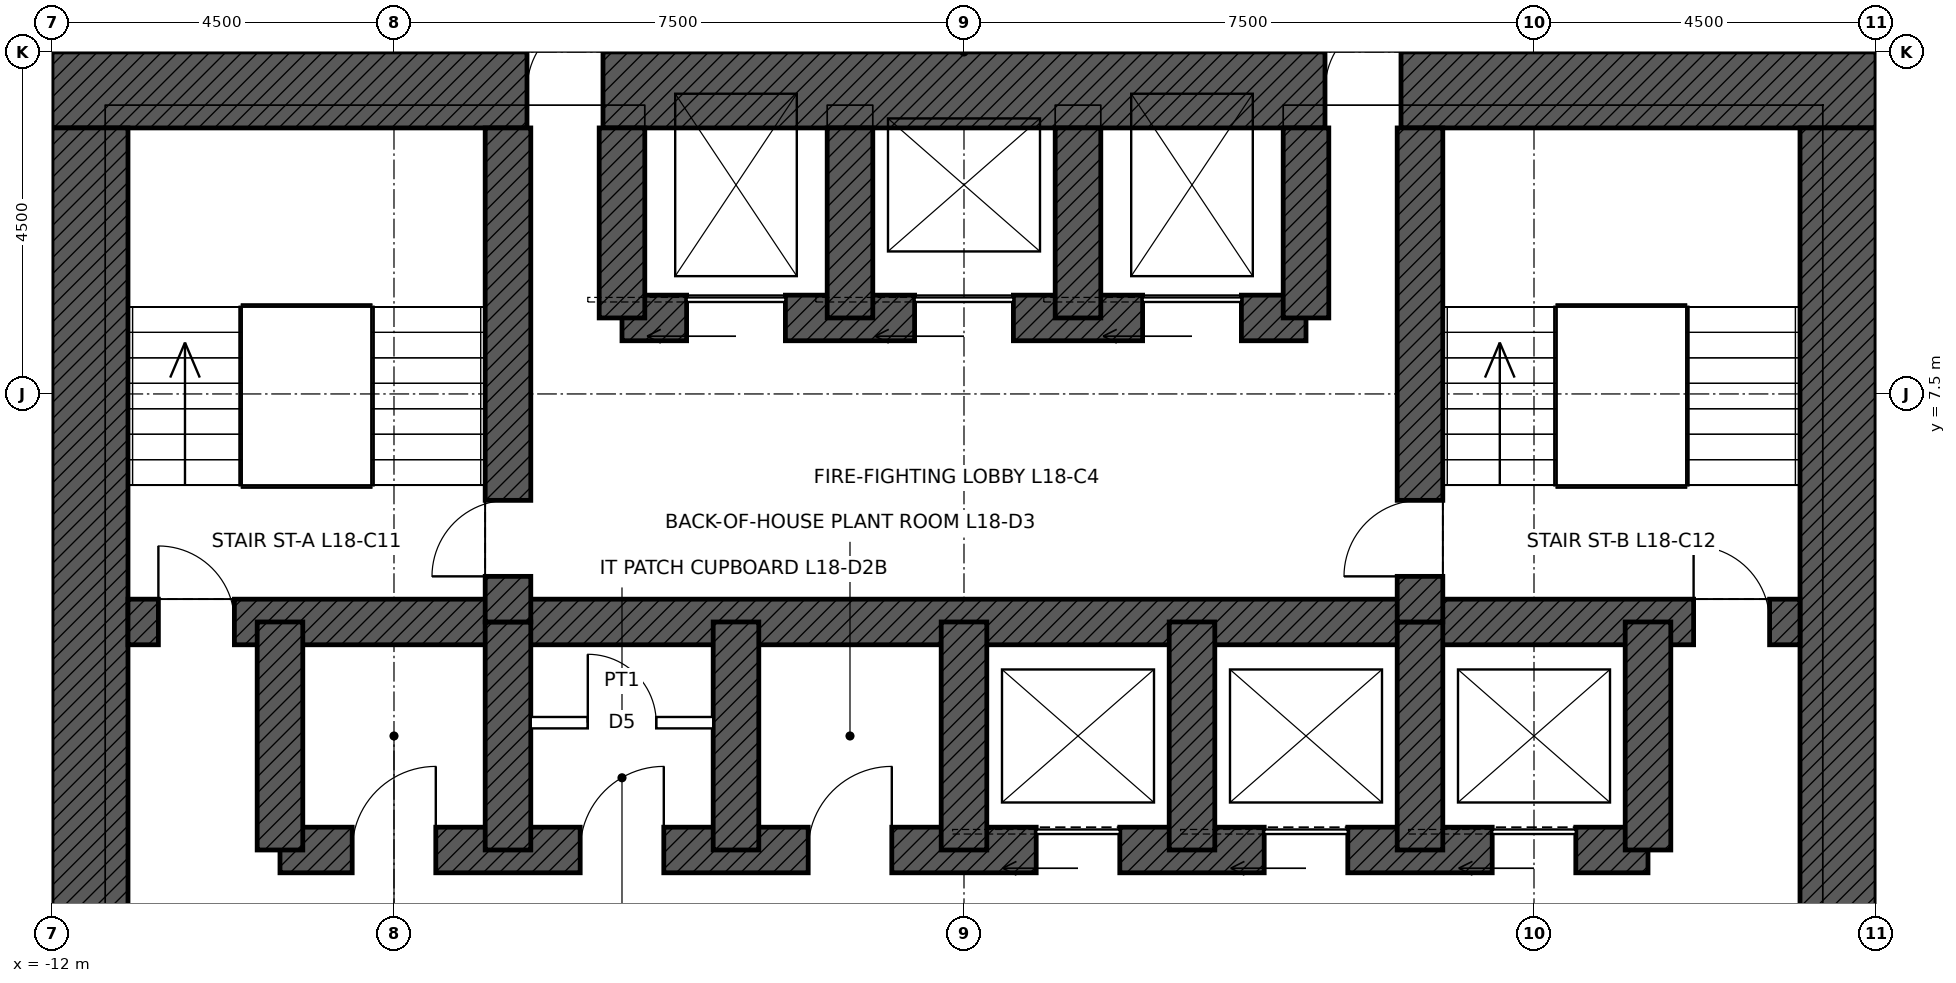
"""IFC4 building model, lengths in metres.
Left out: names, types, materials, properties, quantities, classifications, styles, units other than length and angle.
Written with IfcOpenShell. Run it as: python <this file> out.ifc"""

import sys

from ifc_helpers import new_model, si_unit, direction, frame, frame_2d, origin, place, context, subcontext, project, spatial, rectangle, extrude, element, fill, save


model = new_model("IFC4")
c1 = context("Model", 3, precision=1e-05, world=origin(), true_north=direction((0.0, 1.0)))
c2 = subcontext(c1, "Body", "Model", "MODEL_VIEW")
j1 = project(units=[si_unit("LENGTHUNIT", "METRE"), si_unit("PLANEANGLEUNIT", "RADIAN")], contexts=[c1])
p1 = place(None, origin())
s1 = spatial("IfcSite", under=j1, at=p1, CompositionType="ELEMENT")
p2 = place(p1, origin())
s2 = spatial("IfcBuilding", under=s1, at=p2, CompositionType="ELEMENT")
p3 = place(p2, frame((0.0, 0.0, 93.4)))
s3 = spatial("IfcBuildingStorey", under=s2, at=p3, CompositionType="ELEMENT", Elevation=93.4)
p4 = place(p3, frame((-12.0, 11.5, 0.0), z_axis=(0.0, 0.0, 1.0), x_axis=(1.0, 0.0, 0.0)))
e1 = element("IfcWall", 1, at=p4, inside=s3, PredefinedType="SHEAR", context=c2, shape_type="SweptSolid", body=[
    extrude(rectangle(XDim=24.0, YDim=1.0, at=frame_2d((12.0, 0.0))), origin(), (0.0, 0.0, 1.0), 5.0),
])
p5 = place(p4, frame((6.25, 0.0, 0.0)))
e2 = element("IfcOpeningElement", 2, at=p5, cuts=e1, PredefinedType="OPENING", context=c2, shape_type="SweptSolid", body=[
    extrude(rectangle(XDim=1.0, YDim=2.4, at=frame_2d((0.5, 1.2))), frame((0.0, 0.51, 0.0), z_axis=(0.0, -1.0, 0.0), x_axis=(1.0, 0.0, 0.0)), (0.0, 0.0, 1.0), 1.02),
])
p6 = place(p4, frame((16.75, 0.0, 0.0)))
e3 = element("IfcOpeningElement", 3, at=p6, cuts=e1, PredefinedType="OPENING", context=c2, shape_type="SweptSolid", body=[
    extrude(rectangle(XDim=1.0, YDim=2.4, at=frame_2d((0.5, 1.2))), frame((0.0, 0.51, 0.0), z_axis=(0.0, -1.0, 0.0), x_axis=(1.0, 0.0, 0.0)), (0.0, 0.0, 1.0), 1.02),
])
p7 = place(p3, frame((11.5, 11.0, 0.0), z_axis=(0.0, 0.0, 1.0), x_axis=(0.0, -1.0, 0.0)))
e4 = element("IfcWall", 4, at=p7, inside=s3, PredefinedType="SHEAR", context=c2, shape_type="SweptSolid", body=[
    extrude(rectangle(XDim=22.0, YDim=1.0, at=frame_2d((11.0, 0.0))), origin(), (0.0, 0.0, 1.0), 5.0),
])
p8 = place(p7, frame((10.5, 0.0, 0.0)))
e5 = element("IfcOpeningElement", 5, at=p8, cuts=e4, PredefinedType="OPENING", context=c2, shape_type="SweptSolid", body=[
    extrude(rectangle(XDim=1.0, YDim=2.4, at=frame_2d((0.5, 1.2))), frame((0.0, 0.51, 0.0), z_axis=(0.0, -1.0, 0.0), x_axis=(1.0, 0.0, 0.0)), (0.0, 0.0, 1.0), 1.02),
])
p9 = place(p3, frame((-11.5, -11.0, 0.0), z_axis=(0.0, 0.0, 1.0), x_axis=(0.0, 1.0, 0.0)))
e6 = element("IfcWall", 6, at=p9, inside=s3, PredefinedType="SHEAR", context=c2, shape_type="SweptSolid", body=[
    extrude(rectangle(XDim=22.0, YDim=1.0, at=frame_2d((11.0, 0.0))), origin(), (0.0, 0.0, 1.0), 5.0),
])
p10 = place(p9, frame((10.5, 0.0, 0.0)))
e7 = element("IfcOpeningElement", 7, at=p10, cuts=e6, PredefinedType="OPENING", context=c2, shape_type="SweptSolid", body=[
    extrude(rectangle(XDim=1.0, YDim=2.4, at=frame_2d((0.5, 1.2))), frame((0.0, 0.51, 0.0), z_axis=(0.0, -1.0, 0.0), x_axis=(1.0, 0.0, 0.0)), (0.0, 0.0, 1.0), 1.02),
])
p11 = place(p3, frame((-11.0, 4.5, 0.0), z_axis=(0.0, 0.0, 1.0), x_axis=(1.0, 0.0, 0.0)))
e8 = element("IfcWall", 8, at=p11, inside=s3, PredefinedType="SHEAR", context=c2, shape_type="SweptSolid", body=[
    extrude(rectangle(XDim=22.0, YDim=0.6, at=frame_2d((11.0, 0.0))), origin(), (0.0, 0.0, 1.0), 5.0),
])
p12 = place(p11, frame((0.4, 0.0, 0.0)))
e9 = element("IfcOpeningElement", 9, at=p12, cuts=e8, PredefinedType="OPENING", context=c2, shape_type="SweptSolid", body=[
    extrude(rectangle(XDim=1.0, YDim=2.1, at=frame_2d((0.5, 1.05))), frame((0.0, 0.31, 0.0), z_axis=(0.0, -1.0, 0.0), x_axis=(1.0, 0.0, 0.0)), (0.0, 0.0, 1.0), 0.62),
])
p13 = place(p11, frame((20.6, 0.0, 0.0)))
e10 = element("IfcOpeningElement", 10, at=p13, cuts=e8, PredefinedType="OPENING", context=c2, shape_type="SweptSolid", body=[
    extrude(rectangle(XDim=1.0, YDim=2.1, at=frame_2d((0.5, 1.05))), frame((0.0, 0.31, 0.0), z_axis=(0.0, -1.0, 0.0), x_axis=(1.0, 0.0, 0.0)), (0.0, 0.0, 1.0), 0.62),
])
p14 = place(p3, frame((-9.0, 1.5, 0.0), z_axis=(0.0, 0.0, 1.0), x_axis=(1.0, 0.0, 0.0)))
e11 = element("IfcWall", 11, at=p14, inside=s3, PredefinedType="SHEAR", context=c2, shape_type="SweptSolid", body=[
    extrude(rectangle(XDim=18.0, YDim=0.6, at=frame_2d((9.0, 0.0))), origin(), (0.0, 0.0, 1.0), 5.0),
])
p15 = place(p14, frame((9.95, 0.0, 0.0)))
e12 = element("IfcOpeningElement", 12, at=p15, cuts=e11, PredefinedType="OPENING", context=c2, shape_type="SweptSolid", body=[
    extrude(rectangle(XDim=1.1, YDim=2.1, at=frame_2d((0.55, 1.05))), frame((0.0, 0.31, 0.0), z_axis=(0.0, -1.0, 0.0), x_axis=(1.0, 0.0, 0.0)), (0.0, 0.0, 1.0), 0.62),
])
p16 = place(p14, frame((12.95, 0.0, 0.0)))
e13 = element("IfcOpeningElement", 13, at=p16, cuts=e11, PredefinedType="OPENING", context=c2, shape_type="SweptSolid", body=[
    extrude(rectangle(XDim=1.1, YDim=2.1, at=frame_2d((0.55, 1.05))), frame((0.0, 0.31, 0.0), z_axis=(0.0, -1.0, 0.0), x_axis=(1.0, 0.0, 0.0)), (0.0, 0.0, 1.0), 0.62),
])
p17 = place(p14, frame((15.95, 0.0, 0.0)))
e14 = element("IfcOpeningElement", 14, at=p17, cuts=e11, PredefinedType="OPENING", context=c2, shape_type="SweptSolid", body=[
    extrude(rectangle(XDim=1.1, YDim=2.1, at=frame_2d((0.55, 1.05))), frame((0.0, 0.31, 0.0), z_axis=(0.0, -1.0, 0.0), x_axis=(1.0, 0.0, 0.0)), (0.0, 0.0, 1.0), 0.62),
])
p18 = place(p14, frame((0.95, 0.0, 0.0)))
e15 = element("IfcOpeningElement", 15, at=p18, cuts=e11, PredefinedType="OPENING", context=c2, shape_type="SweptSolid", body=[
    extrude(rectangle(XDim=1.1, YDim=2.1, at=frame_2d((0.55, 1.05))), frame((0.0, 0.31, 0.0), z_axis=(0.0, -1.0, 0.0), x_axis=(1.0, 0.0, 0.0)), (0.0, 0.0, 1.0), 0.62),
])
p19 = place(p14, frame((3.95, 0.0, 0.0)))
e16 = element("IfcOpeningElement", 16, at=p19, cuts=e11, PredefinedType="OPENING", context=c2, shape_type="SweptSolid", body=[
    extrude(rectangle(XDim=1.1, YDim=2.1, at=frame_2d((0.55, 1.05))), frame((0.0, 0.31, 0.0), z_axis=(0.0, -1.0, 0.0), x_axis=(1.0, 0.0, 0.0)), (0.0, 0.0, 1.0), 0.62),
])
p20 = place(p14, frame((6.95, 0.0, 0.0)))
e17 = element("IfcOpeningElement", 17, at=p20, cuts=e11, PredefinedType="OPENING", context=c2, shape_type="SweptSolid", body=[
    extrude(rectangle(XDim=1.1, YDim=2.1, at=frame_2d((0.55, 1.05))), frame((0.0, 0.31, 0.0), z_axis=(0.0, -1.0, 0.0), x_axis=(1.0, 0.0, 0.0)), (0.0, 0.0, 1.0), 0.62),
])
p21 = place(p3, frame((-4.5, 8.5, 0.0), z_axis=(0.0, 0.0, 1.0), x_axis=(1.0, 0.0, 0.0)))
e18 = element("IfcWall", 18, at=p21, inside=s3, PredefinedType="SHEAR", context=c2, shape_type="SweptSolid", body=[
    extrude(rectangle(XDim=9.0, YDim=0.6, at=frame_2d((4.5, 0.0))), origin(), (0.0, 0.0, 1.0), 5.0),
])
p22 = place(p21, frame((0.85, 0.0, 0.0)))
e19 = element("IfcOpeningElement", 19, at=p22, cuts=e18, PredefinedType="OPENING", context=c2, shape_type="SweptSolid", body=[
    extrude(rectangle(XDim=1.3, YDim=2.4, at=frame_2d((0.65, 1.2))), frame((0.0, 0.31, 0.0), z_axis=(0.0, -1.0, 0.0), x_axis=(1.0, 0.0, 0.0)), (0.0, 0.0, 1.0), 0.62),
])
p23 = place(p21, frame((6.85, 0.0, 0.0)))
e20 = element("IfcOpeningElement", 20, at=p23, cuts=e18, PredefinedType="OPENING", context=c2, shape_type="SweptSolid", body=[
    extrude(rectangle(XDim=1.3, YDim=2.4, at=frame_2d((0.65, 1.2))), frame((0.0, 0.31, 0.0), z_axis=(0.0, -1.0, 0.0), x_axis=(1.0, 0.0, 0.0)), (0.0, 0.0, 1.0), 0.62),
])
p24 = place(p21, frame((3.85, 0.0, 0.0)))
e21 = element("IfcOpeningElement", 21, at=p24, cuts=e18, PredefinedType="OPENING", context=c2, shape_type="SweptSolid", body=[
    extrude(rectangle(XDim=1.3, YDim=2.4, at=frame_2d((0.65, 1.2))), frame((0.0, 0.31, 0.0), z_axis=(0.0, -1.0, 0.0), x_axis=(1.0, 0.0, 0.0)), (0.0, 0.0, 1.0), 0.62),
])
for number, where, z_axis, x_axis in (
    (22, (-9.0, 1.5, 0.0), (0.0, 0.0, 1.0), (0.0, 1.0, 0.0)),
    (23, (9.0, 1.5, 0.0), (0.0, 0.0, 1.0), (0.0, 1.0, 0.0)),
    (24, (-6.0, 1.5, 0.0), (0.0, 0.0, 1.0), (0.0, 1.0, 0.0)),
    (25, (-3.0, 1.5, 0.0), (0.0, 0.0, 1.0), (0.0, 1.0, 0.0)),
    (26, (0.0, 1.5, 0.0), (0.0, 0.0, 1.0), (0.0, 1.0, 0.0)),
    (27, (3.0, 1.5, 0.0), (0.0, 0.0, 1.0), (0.0, 1.0, 0.0)),
    (28, (6.0, 1.5, 0.0), (0.0, 0.0, 1.0), (0.0, 1.0, 0.0)),
):
    element("IfcWall", number, at=place(p3, frame(where, z_axis=z_axis, x_axis=x_axis)), inside=s3, PredefinedType="SHEAR", context=c2, shape_type="SweptSolid", body=[
        extrude(rectangle(XDim=3.0, YDim=0.6, at=frame_2d((1.5, 0.0))), origin(), (0.0, 0.0, 1.0), 5.0),
    ])
p25 = place(p3, frame((-6.0, 4.5, 0.0), z_axis=(0.0, 0.0, 1.0), x_axis=(0.0, 1.0, 0.0)))
e29 = element("IfcWall", 29, at=p25, inside=s3, PredefinedType="SHEAR", context=c2, shape_type="SweptSolid", body=[
    extrude(rectangle(XDim=6.5, YDim=0.6, at=frame_2d((3.25, 0.0))), origin(), (0.0, 0.0, 1.0), 5.0),
])
p26 = place(p25, frame((0.6, 0.0, 0.0)))
e30 = element("IfcOpeningElement", 30, at=p26, cuts=e29, PredefinedType="OPENING", context=c2, shape_type="SweptSolid", body=[
    extrude(rectangle(XDim=1.0, YDim=2.1, at=frame_2d((0.5, 1.05))), frame((0.0, 0.31, 0.0), z_axis=(0.0, -1.0, 0.0), x_axis=(1.0, 0.0, 0.0)), (0.0, 0.0, 1.0), 0.62),
])
p27 = place(p3, frame((6.0, 4.5, 0.0), z_axis=(0.0, 0.0, 1.0), x_axis=(0.0, 1.0, 0.0)))
e31 = element("IfcWall", 31, at=p27, inside=s3, PredefinedType="SHEAR", context=c2, shape_type="SweptSolid", body=[
    extrude(rectangle(XDim=6.5, YDim=0.6, at=frame_2d((3.25, 0.0))), origin(), (0.0, 0.0, 1.0), 5.0),
])
p28 = place(p27, frame((0.6, 0.0, 0.0)))
e32 = element("IfcOpeningElement", 32, at=p28, cuts=e31, PredefinedType="OPENING", context=c2, shape_type="SweptSolid", body=[
    extrude(rectangle(XDim=1.0, YDim=2.1, at=frame_2d((0.5, 1.05))), frame((0.0, 0.31, 0.0), z_axis=(0.0, -1.0, 0.0), x_axis=(1.0, 0.0, 0.0)), (0.0, 0.0, 1.0), 0.62),
])
for number, where, z_axis, x_axis in (
    (33, (-4.5, 8.5, 0.0), (0.0, 0.0, 1.0), (0.0, 1.0, 0.0)),
    (34, (4.5, 8.5, 0.0), (0.0, 0.0, 1.0), (0.0, 1.0, 0.0)),
    (35, (-1.5, 8.5, 0.0), (0.0, 0.0, 1.0), (0.0, 1.0, 0.0)),
    (36, (1.5, 8.5, 0.0), (0.0, 0.0, 1.0), (0.0, 1.0, 0.0)),
):
    element("IfcWall", number, at=place(p3, frame(where, z_axis=z_axis, x_axis=x_axis)), inside=s3, PredefinedType="SHEAR", context=c2, shape_type="SweptSolid", body=[
        extrude(rectangle(XDim=2.5, YDim=0.6, at=frame_2d((1.25, 0.0))), origin(), (0.0, 0.0, 1.0), 5.0),
    ])
p29 = place(p3, frame((-5.7, 3.175, 0.0), z_axis=(0.0, 0.0, 1.0), x_axis=(1.0, 0.0, 0.0)))
e37 = element("IfcWall", 37, at=p29, inside=s3, PredefinedType="PARTITIONING", context=c2, shape_type="SweptSolid", body=[
    extrude(rectangle(XDim=2.4, YDim=0.15, at=frame_2d((1.2, 0.0))), origin(), (0.0, 0.0, 1.0), 4.75),
])
p30 = place(p29, frame((0.75, 0.0, 0.0)))
e38 = element("IfcOpeningElement", 38, at=p30, cuts=e37, PredefinedType="OPENING", context=c2, shape_type="SweptSolid", body=[
    extrude(rectangle(XDim=0.9, YDim=2.1, at=frame_2d((0.45, 1.05))), frame((0.0, 0.085, 0.0), z_axis=(0.0, -1.0, 0.0), x_axis=(1.0, 0.0, 0.0)), (0.0, 0.0, 1.0), 0.17),
])
p31 = place(p12, origin())
e39 = element("IfcDoor", 39, at=p31, inside=s3, OperationType="SINGLE_SWING_LEFT", PredefinedType="DOOR", context=c2, shape_type="SweptSolid", body=[
    extrude(rectangle(XDim=1.0, YDim=2.1, at=frame_2d((0.5, 1.05))), frame((0.0, 0.025, 0.0), z_axis=(0.0, -1.0, 0.0), x_axis=(1.0, 0.0, 0.0)), (0.0, 0.0, 1.0), 0.05),
])
fill(e9, e39)
p32 = place(p13, origin())
e40 = element("IfcDoor", 40, at=p32, inside=s3, OperationType="SINGLE_SWING_LEFT", PredefinedType="DOOR", context=c2, shape_type="SweptSolid", body=[
    extrude(rectangle(XDim=1.0, YDim=2.1, at=frame_2d((0.5, 1.05))), frame((0.0, 0.025, 0.0), z_axis=(0.0, -1.0, 0.0), x_axis=(1.0, 0.0, 0.0)), (0.0, 0.0, 1.0), 0.05),
])
fill(e10, e40)
p33 = place(p26, origin())
e41 = element("IfcDoor", 41, at=p33, inside=s3, OperationType="SINGLE_SWING_LEFT", PredefinedType="DOOR", context=c2, shape_type="SweptSolid", body=[
    extrude(rectangle(XDim=1.0, YDim=2.1, at=frame_2d((0.5, 1.05))), frame((0.0, 0.025, 0.0), z_axis=(0.0, -1.0, 0.0), x_axis=(1.0, 0.0, 0.0)), (0.0, 0.0, 1.0), 0.05),
])
fill(e30, e41)
p34 = place(p28, origin())
e42 = element("IfcDoor", 42, at=p34, inside=s3, OperationType="SINGLE_SWING_LEFT", PredefinedType="DOOR", context=c2, shape_type="SweptSolid", body=[
    extrude(rectangle(XDim=1.0, YDim=2.1, at=frame_2d((0.5, 1.05))), frame((0.0, 0.025, 0.0), z_axis=(0.0, -1.0, 0.0), x_axis=(1.0, 0.0, 0.0)), (0.0, 0.0, 1.0), 0.05),
])
fill(e32, e42)
p35 = place(p5, origin())
e43 = element("IfcDoor", 43, at=p35, inside=s3, OperationType="SINGLE_SWING_RIGHT", PredefinedType="DOOR", context=c2, shape_type="SweptSolid", body=[
    extrude(rectangle(XDim=1.0, YDim=2.4, at=frame_2d((0.5, 1.2))), frame((0.0, 0.485, 0.0), z_axis=(0.0, -1.0, 0.0), x_axis=(1.0, 0.0, 0.0)), (0.0, 0.0, 1.0), 0.05),
])
fill(e2, e43)
p36 = place(p6, origin())
e44 = element("IfcDoor", 44, at=p36, inside=s3, OperationType="SINGLE_SWING_RIGHT", PredefinedType="DOOR", context=c2, shape_type="SweptSolid", body=[
    extrude(rectangle(XDim=1.0, YDim=2.4, at=frame_2d((0.5, 1.2))), frame((0.0, 0.485, 0.0), z_axis=(0.0, -1.0, 0.0), x_axis=(1.0, 0.0, 0.0)), (0.0, 0.0, 1.0), 0.05),
])
fill(e3, e44)
p37 = place(p22, origin())
e45 = element("IfcDoor", 45, at=p37, inside=s3, OperationType="SLIDING_TO_LEFT", PredefinedType="DOOR", context=c2, shape_type="SweptSolid", body=[
    extrude(rectangle(XDim=1.3, YDim=2.4, at=frame_2d((0.65, 1.2))), frame((0.0, 0.025, 0.0), z_axis=(0.0, -1.0, 0.0), x_axis=(1.0, 0.0, 0.0)), (0.0, 0.0, 1.0), 0.05),
])
fill(e19, e45)
p38 = place(p23, origin())
e46 = element("IfcDoor", 46, at=p38, inside=s3, OperationType="SLIDING_TO_LEFT", PredefinedType="DOOR", context=c2, shape_type="SweptSolid", body=[
    extrude(rectangle(XDim=1.3, YDim=2.4, at=frame_2d((0.65, 1.2))), frame((0.0, 0.025, 0.0), z_axis=(0.0, -1.0, 0.0), x_axis=(1.0, 0.0, 0.0)), (0.0, 0.0, 1.0), 0.05),
])
fill(e20, e46)
p39 = place(p24, origin())
e47 = element("IfcDoor", 47, at=p39, inside=s3, OperationType="SLIDING_TO_LEFT", PredefinedType="DOOR", context=c2, shape_type="SweptSolid", body=[
    extrude(rectangle(XDim=1.3, YDim=2.4, at=frame_2d((0.65, 1.2))), frame((0.0, 0.025, 0.0), z_axis=(0.0, -1.0, 0.0), x_axis=(1.0, 0.0, 0.0)), (0.0, 0.0, 1.0), 0.05),
])
fill(e21, e47)
p40 = place(p15, origin())
e48 = element("IfcDoor", 48, at=p40, inside=s3, OperationType="SLIDING_TO_LEFT", PredefinedType="DOOR", context=c2, shape_type="SweptSolid", body=[
    extrude(rectangle(XDim=1.1, YDim=2.1, at=frame_2d((0.55, 1.05))), frame((0.0, 0.025, 0.0), z_axis=(0.0, -1.0, 0.0), x_axis=(1.0, 0.0, 0.0)), (0.0, 0.0, 1.0), 0.05),
])
fill(e12, e48)
p41 = place(p16, origin())
e49 = element("IfcDoor", 49, at=p41, inside=s3, OperationType="SLIDING_TO_LEFT", PredefinedType="DOOR", context=c2, shape_type="SweptSolid", body=[
    extrude(rectangle(XDim=1.1, YDim=2.1, at=frame_2d((0.55, 1.05))), frame((0.0, 0.025, 0.0), z_axis=(0.0, -1.0, 0.0), x_axis=(1.0, 0.0, 0.0)), (0.0, 0.0, 1.0), 0.05),
])
fill(e13, e49)
p42 = place(p17, origin())
e50 = element("IfcDoor", 50, at=p42, inside=s3, OperationType="SLIDING_TO_LEFT", PredefinedType="DOOR", context=c2, shape_type="SweptSolid", body=[
    extrude(rectangle(XDim=1.1, YDim=2.1, at=frame_2d((0.55, 1.05))), frame((0.0, 0.025, 0.0), z_axis=(0.0, -1.0, 0.0), x_axis=(1.0, 0.0, 0.0)), (0.0, 0.0, 1.0), 0.05),
])
fill(e14, e50)
p43 = place(p18, origin())
e51 = element("IfcDoor", 51, at=p43, inside=s3, OperationType="SINGLE_SWING_RIGHT", PredefinedType="DOOR", context=c2, shape_type="SweptSolid", body=[
    extrude(rectangle(XDim=1.1, YDim=2.1, at=frame_2d((0.55, 1.05))), frame((0.0, 0.025, 0.0), z_axis=(0.0, -1.0, 0.0), x_axis=(1.0, 0.0, 0.0)), (0.0, 0.0, 1.0), 0.05),
])
fill(e15, e51)
p44 = place(p19, origin())
e52 = element("IfcDoor", 52, at=p44, inside=s3, OperationType="SINGLE_SWING_RIGHT", PredefinedType="DOOR", context=c2, shape_type="SweptSolid", body=[
    extrude(rectangle(XDim=1.1, YDim=2.1, at=frame_2d((0.55, 1.05))), frame((0.0, 0.025, 0.0), z_axis=(0.0, -1.0, 0.0), x_axis=(1.0, 0.0, 0.0)), (0.0, 0.0, 1.0), 0.05),
])
fill(e16, e52)
p45 = place(p30, origin())
e53 = element("IfcDoor", 53, at=p45, inside=s3, OperationType="SINGLE_SWING_LEFT", PredefinedType="DOOR", context=c2, shape_type="SweptSolid", body=[
    extrude(rectangle(XDim=0.9, YDim=2.1, at=frame_2d((0.45, 1.05))), frame((0.0, 0.025, 0.0), z_axis=(0.0, -1.0, 0.0), x_axis=(1.0, 0.0, 0.0)), (0.0, 0.0, 1.0), 0.05),
])
fill(e38, e53)
p46 = place(p20, origin())
e54 = element("IfcDoor", 54, at=p46, inside=s3, OperationType="SINGLE_SWING_RIGHT", PredefinedType="DOOR", context=c2, shape_type="SweptSolid", body=[
    extrude(rectangle(XDim=1.1, YDim=2.1, at=frame_2d((0.55, 1.05))), frame((0.0, 0.025, 0.0), z_axis=(0.0, -1.0, 0.0), x_axis=(1.0, 0.0, 0.0)), (0.0, 0.0, 1.0), 0.05),
])
fill(e17, e54)
save(model, sys.argv[1])
